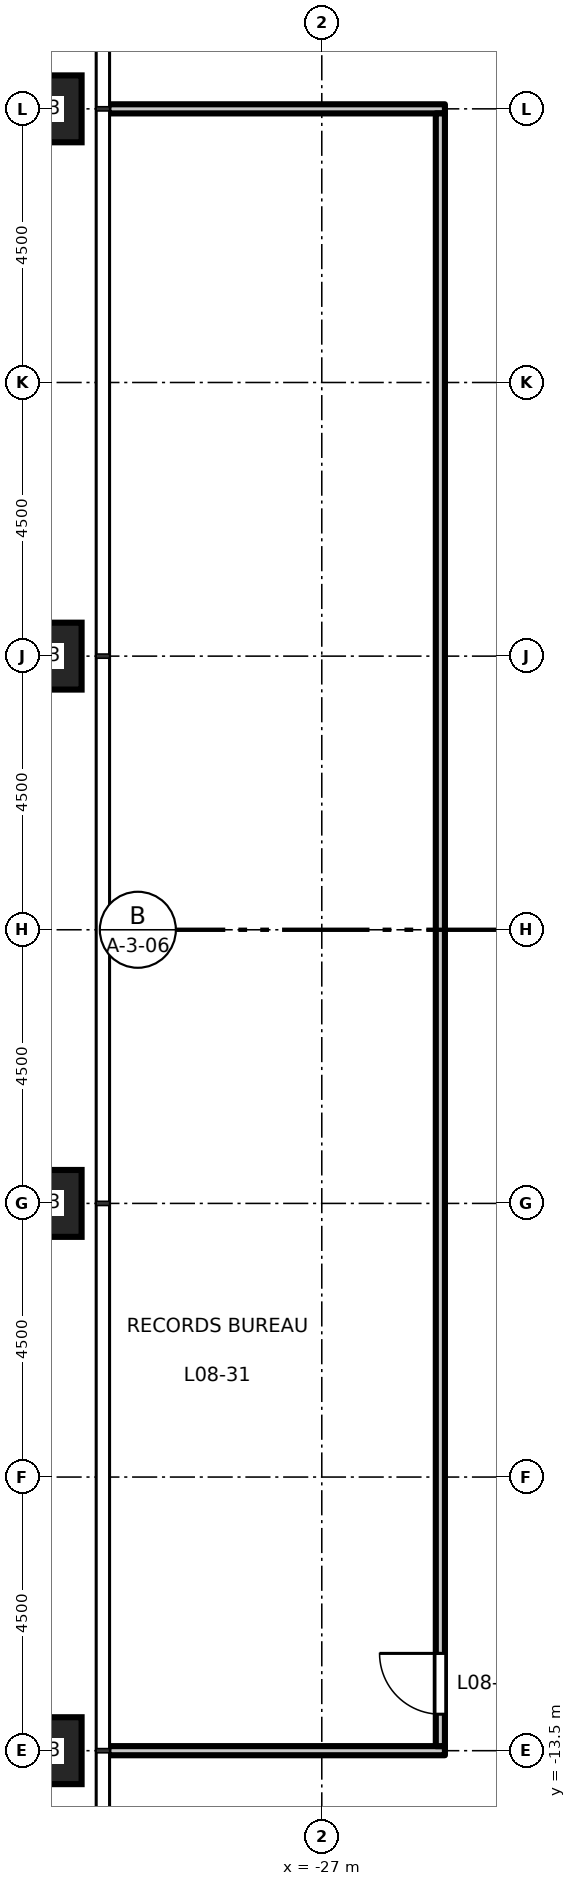
"""IFC4 building model, lengths in metres.
Left out: names, types, materials, properties, quantities, classifications, styles, units other than length and angle.
Written with IfcOpenShell. Run it as: python <this file> out.ifc"""

import sys

from ifc_helpers import new_model, si_unit, direction, frame, frame_2d, origin, origin_2d, place, context, subcontext, project, spatial, rectangle, hollow_rectangle, extrude, element, fill, save


model = new_model("IFC4")
c1 = context("Model", 3, precision=1e-05, world=origin(), true_north=direction((0.0, 1.0)))
c2 = subcontext(c1, "Body", "Model", "MODEL_VIEW")
j1 = project(units=[si_unit("LENGTHUNIT", "METRE"), si_unit("PLANEANGLEUNIT", "RADIAN")], contexts=[c1])
p1 = place(None, origin())
s1 = spatial("IfcSite", under=j1, at=p1, CompositionType="ELEMENT")
p2 = place(p1, origin())
s2 = spatial("IfcBuilding", under=s1, at=p2, CompositionType="ELEMENT")
p3 = place(p2, frame((0.0, 0.0, 40.2)))
s3 = spatial("IfcBuildingStorey", under=s2, at=p3, CompositionType="ELEMENT", Elevation=40.2)
for number, where, z_axis, x_axis in (
    (1, (-31.5, 13.5, 0.0), (0.0, 0.0, 1.0), (1.0, 0.0, 0.0)),
    (2, (-31.5, 4.5, 0.0), (0.0, 0.0, 1.0), (1.0, 0.0, 0.0)),
    (3, (-31.5, -4.5, 0.0), (0.0, 0.0, 1.0), (1.0, 0.0, 0.0)),
    (4, (-31.5, -13.5, 0.0), (0.0, 0.0, 1.0), (1.0, 0.0, 0.0)),
):
    element("IfcColumn", number, at=place(p3, frame(where, z_axis=z_axis, x_axis=x_axis)), inside=s3, PredefinedType="COLUMN", context=c2, shape_type="SweptSolid", body=[
        extrude(hollow_rectangle(XDim=1.1, YDim=1.1, WallThickness=0.07, at=origin_2d()), origin(), (0.0, 0.0, 1.0), 4.5),
    ])
for number, where, z_axis, x_axis in (
    (5, (-30.51, -13.5, 0.0), (0.0, 0.0, 1.0), (1.0, 0.0, 0.0)),
    (6, (-30.51, 13.5, 0.0), (0.0, 0.0, 1.0), (1.0, 0.0, 0.0)),
):
    element("IfcWall", number, at=place(p3, frame(where, z_axis=z_axis, x_axis=x_axis)), inside=s3, PredefinedType="PARTITIONING", context=c2, shape_type="SweptSolid", body=[
        extrude(rectangle(XDim=5.535, YDim=0.15, at=frame_2d((2.768, 0.0))), origin(), (0.0, 0.0, 1.0), 3.35),
    ])
p4 = place(p3, frame((-25.05, -13.425, 0.0), z_axis=(0.0, 0.0, 1.0), x_axis=(0.0, 1.0, 0.0)))
e7 = element("IfcWall", 7, at=p4, inside=s3, PredefinedType="PARTITIONING", context=c2, shape_type="SweptSolid", body=[
    extrude(rectangle(XDim=26.85, YDim=0.15, at=frame_2d((13.425, 0.0))), origin(), (0.0, 0.0, 1.0), 4.35),
])
p5 = place(p4, frame((0.525, 0.0, 0.0)))
e8 = element("IfcOpeningElement", 8, at=p5, cuts=e7, PredefinedType="OPENING", context=c2, shape_type="SweptSolid", body=[
    extrude(rectangle(XDim=1.0, YDim=2.1, at=frame_2d((0.5, 1.05))), frame((0.0, 0.085, 0.0), z_axis=(0.0, -1.0, 0.0), x_axis=(1.0, 0.0, 0.0)), (0.0, 0.0, 1.0), 0.17),
])
p6 = place(p5, origin())
e9 = element("IfcDoor", 9, at=p6, inside=s3, OperationType="SINGLE_SWING_RIGHT", PredefinedType="DOOR", context=c2, shape_type="SweptSolid", body=[
    extrude(rectangle(XDim=1.0, YDim=2.1, at=frame_2d((0.5, 1.05))), frame((0.0, 0.025, 0.0), z_axis=(0.0, -1.0, 0.0), x_axis=(1.0, 0.0, 0.0)), (0.0, 0.0, 1.0), 0.05),
])
fill(e8, e9)
save(model, sys.argv[1])
